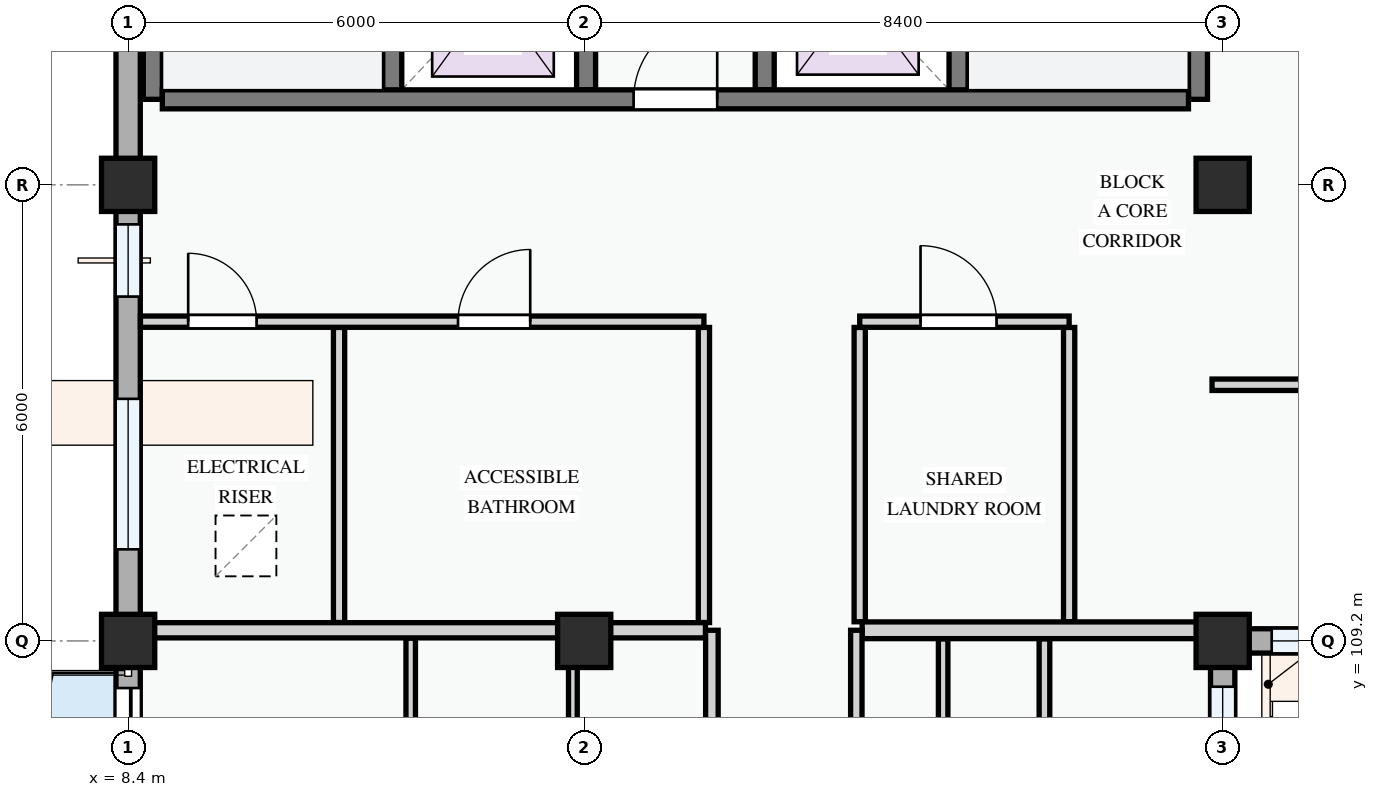
"""IFC4 building model, lengths in metres.
Left out: names, types, materials, properties, quantities, classifications, styles, units other than length and angle.
Written with IfcOpenShell. Run it as: python <this file> out.ifc"""

import sys

from ifc_helpers import new_model, si_unit, direction, frame, frame_2d, origin, origin_2d, place, context, subcontext, project, spatial, rectangle, extrude, element, fill, save


model = new_model("IFC4")
c1 = context("Model", 3, precision=1e-05, world=origin(), true_north=direction((0.0, 1.0)))
c2 = subcontext(c1, "Body", "Model", "MODEL_VIEW")
j1 = project(units=[si_unit("LENGTHUNIT", "METRE"), si_unit("PLANEANGLEUNIT", "RADIAN")], contexts=[c1])
p1 = place(None, origin())
s1 = spatial("IfcSite", under=j1, at=p1, CompositionType="ELEMENT")
p2 = place(p1, origin())
s2 = spatial("IfcBuilding", under=s1, at=p2, CompositionType="ELEMENT")
p3 = place(p2, frame((0.0, 0.0, 21.3)))
s3 = spatial("IfcBuildingStorey", under=s2, at=p3, CompositionType="ELEMENT", Elevation=21.3)
for number, where, z_axis, x_axis in (
    (1, (8.4, 109.2, 0.0), (0.0, 0.0, 1.0), (1.0, 0.0, 0.0)),
    (2, (8.4, 115.2, 0.0), (0.0, 0.0, 1.0), (1.0, 0.0, 0.0)),
    (3, (14.4, 109.2, 0.0), (0.0, 0.0, 1.0), (1.0, 0.0, 0.0)),
    (4, (22.8, 109.2, 0.0), (0.0, 0.0, 1.0), (1.0, 0.0, 0.0)),
    (5, (22.8, 115.2, 0.0), (0.0, 0.0, 1.0), (1.0, 0.0, 0.0)),
):
    element("IfcColumn", number, at=place(p3, frame(where, z_axis=z_axis, x_axis=x_axis)), inside=s3, PredefinedType="COLUMN", context=c2, shape_type="SweptSolid", body=[
        extrude(rectangle(XDim=0.7, YDim=0.7, at=origin_2d()), origin(), (0.0, 0.0, 1.0), 3.3),
    ])
p4 = place(p3, frame((22.8, 109.2, 0.0), z_axis=(0.0, 0.0, 1.0), x_axis=(1.0, 0.0, 0.0)))
e6 = element("IfcWall", 6, at=p4, inside=s3, PredefinedType="STANDARD", context=c2, shape_type="SweptSolid", body=[
    extrude(rectangle(XDim=6.0, YDim=0.32, at=frame_2d((3.0, 0.0))), origin(), (0.0, 0.0, 1.0), 2.475),
])
p5 = place(p4, frame((0.645, 0.0, 0.78)))
e7 = element("IfcOpeningElement", 7, at=p5, cuts=e6, PredefinedType="OPENING", context=c2, shape_type="SweptSolid", body=[
    extrude(rectangle(XDim=1.25, YDim=1.45, at=frame_2d((0.625, 0.725))), frame((0.0, 0.17, 0.0), z_axis=(0.0, -1.0, 0.0), x_axis=(1.0, 0.0, 0.0)), (0.0, 0.0, 1.0), 0.34),
])
p6 = place(p4, frame((3.42, 0.0, 0.78)))
e8 = element("IfcOpeningElement", 8, at=p6, cuts=e6, PredefinedType="OPENING", context=c2, shape_type="SweptSolid", body=[
    extrude(rectangle(XDim=1.32, YDim=1.35, at=frame_2d((0.66, 0.675))), frame((0.0, 0.17, 0.0), z_axis=(0.0, -1.0, 0.0), x_axis=(1.0, 0.0, 0.0)), (0.0, 0.0, 1.0), 0.34),
])
p7 = place(p3, frame((8.4, 123.6, 0.0), z_axis=(0.0, 0.0, 1.0), x_axis=(0.0, -1.0, 0.0)))
e9 = element("IfcWall", 9, at=p7, inside=s3, PredefinedType="STANDARD", context=c2, shape_type="SweptSolid", body=[
    extrude(rectangle(XDim=8.4, YDim=0.32, at=frame_2d((4.2, 0.0))), origin(), (0.0, 0.0, 1.0), 2.345),
])
p8 = place(p7, frame((1.221, 0.0, 0.78)))
e10 = element("IfcOpeningElement", 10, at=p8, cuts=e9, PredefinedType="OPENING", context=c2, shape_type="SweptSolid", body=[
    extrude(rectangle(XDim=1.55, YDim=1.4, at=frame_2d((0.775, 0.7))), frame((0.0, 0.17, 0.0), z_axis=(0.0, -1.0, 0.0), x_axis=(1.0, 0.0, 0.0)), (0.0, 0.0, 1.0), 0.34),
])
p9 = place(p7, frame((4.809, 0.0, 0.78)))
e11 = element("IfcOpeningElement", 11, at=p9, cuts=e9, PredefinedType="OPENING", context=c2, shape_type="SweptSolid", body=[
    extrude(rectangle(XDim=1.32, YDim=1.35, at=frame_2d((0.66, 0.675))), frame((0.0, 0.17, 0.0), z_axis=(0.0, -1.0, 0.0), x_axis=(1.0, 0.0, 0.0)), (0.0, 0.0, 1.0), 0.34),
])
p10 = place(p3, frame((8.4, 115.2, 0.0), z_axis=(0.0, 0.0, 1.0), x_axis=(0.0, -1.0, 0.0)))
e12 = element("IfcWall", 12, at=p10, inside=s3, PredefinedType="STANDARD", context=c2, shape_type="SweptSolid", body=[
    extrude(rectangle(XDim=6.0, YDim=0.32, at=frame_2d((3.0, 0.0))), origin(), (0.0, 0.0, 1.0), 2.445),
])
p11 = place(p10, frame((0.52, 0.0, 0.78)))
e13 = element("IfcOpeningElement", 13, at=p11, cuts=e12, PredefinedType="OPENING", context=c2, shape_type="SweptSolid", body=[
    extrude(rectangle(XDim=0.95, YDim=1.15, at=frame_2d((0.475, 0.575))), frame((0.0, 0.17, 0.0), z_axis=(0.0, -1.0, 0.0), x_axis=(1.0, 0.0, 0.0)), (0.0, 0.0, 1.0), 0.34),
])
p12 = place(p10, frame((2.815, 0.0, 0.78)))
e14 = element("IfcOpeningElement", 14, at=p12, cuts=e12, PredefinedType="OPENING", context=c2, shape_type="SweptSolid", body=[
    extrude(rectangle(XDim=1.98, YDim=1.5, at=frame_2d((0.99, 0.75))), frame((0.0, 0.17, 0.0), z_axis=(0.0, -1.0, 0.0), x_axis=(1.0, 0.0, 0.0)), (0.0, 0.0, 1.0), 0.34),
])
p13 = place(p3, frame((8.4, 109.2, 0.0), z_axis=(0.0, 0.0, 1.0), x_axis=(0.0, -1.0, 0.0)))
e15 = element("IfcWall", 15, at=p13, inside=s3, PredefinedType="STANDARD", context=c2, shape_type="SweptSolid", body=[
    extrude(rectangle(XDim=8.4, YDim=0.32, at=frame_2d((4.2, 0.0))), origin(), (0.0, 0.0, 1.0), 2.345),
])
p14 = place(p13, frame((0.62, 0.0, 0.0)))
e16 = element("IfcOpeningElement", 16, at=p14, cuts=e15, PredefinedType="OPENING", context=c2, shape_type="SweptSolid", body=[
    extrude(rectangle(XDim=1.5, YDim=2.2, at=frame_2d((0.75, 1.1))), frame((0.0, 0.17, 0.0), z_axis=(0.0, -1.0, 0.0), x_axis=(1.0, 0.0, 0.0)), (0.0, 0.0, 1.0), 0.34),
])
p15 = place(p13, frame((2.808, 0.0, 0.78)))
e17 = element("IfcOpeningElement", 17, at=p15, cuts=e15, PredefinedType="OPENING", context=c2, shape_type="SweptSolid", body=[
    extrude(rectangle(XDim=1.55, YDim=1.4, at=frame_2d((0.775, 0.7))), frame((0.0, 0.17, 0.0), z_axis=(0.0, -1.0, 0.0), x_axis=(1.0, 0.0, 0.0)), (0.0, 0.0, 1.0), 0.34),
])
p16 = place(p13, frame((5.363, 0.0, 0.78)))
e18 = element("IfcOpeningElement", 18, at=p16, cuts=e15, PredefinedType="OPENING", context=c2, shape_type="SweptSolid", body=[
    extrude(rectangle(XDim=2.48, YDim=1.46, at=frame_2d((1.24, 0.73))), frame((0.0, 0.17, 0.0), z_axis=(0.0, -1.0, 0.0), x_axis=(1.0, 0.0, 0.0)), (0.0, 0.0, 1.0), 0.34),
])
p17 = place(p3, frame((22.8, 100.8, 0.0), z_axis=(0.0, 0.0, 1.0), x_axis=(0.0, 1.0, 0.0)))
e19 = element("IfcWall", 19, at=p17, inside=s3, PredefinedType="STANDARD", context=c2, shape_type="SweptSolid", body=[
    extrude(rectangle(XDim=8.4, YDim=0.32, at=frame_2d((4.2, 0.0))), origin(), (0.0, 0.0, 1.0), 2.425),
])
p18 = place(p17, frame((0.955, 0.0, 0.78)))
e20 = element("IfcOpeningElement", 20, at=p18, cuts=e19, PredefinedType="OPENING", context=c2, shape_type="SweptSolid", body=[
    extrude(rectangle(XDim=1.48, YDim=1.52, at=frame_2d((0.74, 0.76))), frame((0.0, 0.17, 0.0), z_axis=(0.0, -1.0, 0.0), x_axis=(1.0, 0.0, 0.0)), (0.0, 0.0, 1.0), 0.34),
])
p19 = place(p17, frame((3.887, 0.0, 0.78)))
e21 = element("IfcOpeningElement", 21, at=p19, cuts=e19, PredefinedType="OPENING", context=c2, shape_type="SweptSolid", body=[
    extrude(rectangle(XDim=1.2, YDim=1.35, at=frame_2d((0.6, 0.675))), frame((0.0, 0.17, 0.0), z_axis=(0.0, -1.0, 0.0), x_axis=(1.0, 0.0, 0.0)), (0.0, 0.0, 1.0), 0.34),
])
p20 = place(p17, frame((6.047, 0.0, 0.78)))
e22 = element("IfcOpeningElement", 22, at=p20, cuts=e19, PredefinedType="OPENING", context=c2, shape_type="SweptSolid", body=[
    extrude(rectangle(XDim=1.75, YDim=1.45, at=frame_2d((0.875, 0.725))), frame((0.0, 0.17, 0.0), z_axis=(0.0, -1.0, 0.0), x_axis=(1.0, 0.0, 0.0)), (0.0, 0.0, 1.0), 0.34),
])
p21 = place(p3, frame((11.875, 123.25, 0.0), z_axis=(0.0, 0.0, 1.0), x_axis=(0.0, -1.0, 0.0)))
e23 = element("IfcWall", 23, at=p21, inside=s3, PredefinedType="SHEAR", context=c2, shape_type="SweptSolid", body=[
    extrude(rectangle(XDim=6.925, YDim=0.25, at=frame_2d((3.462, 0.0))), origin(), (0.0, 0.0, 1.0), 3.0),
])
p22 = place(p21, frame((0.35, 0.0, 0.0)))
e24 = element("IfcOpeningElement", 24, at=p22, cuts=e23, PredefinedType="OPENING", context=c2, shape_type="SweptSolid", body=[
    extrude(rectangle(XDim=0.95, YDim=2.1, at=frame_2d((0.475, 1.05))), frame((0.0, 0.135, 0.0), z_axis=(0.0, -1.0, 0.0), x_axis=(1.0, 0.0, 0.0)), (0.0, 0.0, 1.0), 0.27),
])
p23 = place(p3, frame((8.725, 123.4, 0.0), z_axis=(0.0, 0.0, 1.0), x_axis=(0.0, -1.0, 0.0)))
e25 = element("IfcWall", 25, at=p23, inside=s3, PredefinedType="SHEAR", context=c2, shape_type="SweptSolid", body=[
    extrude(rectangle(XDim=7.075, YDim=0.25, at=frame_2d((3.538, 0.0))), origin(), (0.0, 0.0, 1.0), 3.0),
])
p24 = place(p3, frame((22.475, 123.25, 0.0), z_axis=(0.0, 0.0, 1.0), x_axis=(0.0, -1.0, 0.0)))
e26 = element("IfcWall", 26, at=p24, inside=s3, PredefinedType="SHEAR", context=c2, shape_type="SweptSolid", body=[
    extrude(rectangle(XDim=6.925, YDim=0.25, at=frame_2d((3.462, 0.0))), origin(), (0.0, 0.0, 1.0), 3.0),
])
p25 = place(p3, frame((19.325, 123.25, 0.0), z_axis=(0.0, 0.0, 1.0), x_axis=(0.0, -1.0, 0.0)))
e27 = element("IfcWall", 27, at=p25, inside=s3, PredefinedType="SHEAR", context=c2, shape_type="SweptSolid", body=[
    extrude(rectangle(XDim=6.925, YDim=0.25, at=frame_2d((3.462, 0.0))), origin(), (0.0, 0.0, 1.0), 3.0),
])
p26 = place(p25, frame((0.35, 0.0, 0.0)))
e28 = element("IfcOpeningElement", 28, at=p26, cuts=e27, PredefinedType="OPENING", context=c2, shape_type="SweptSolid", body=[
    extrude(rectangle(XDim=0.95, YDim=2.1, at=frame_2d((0.475, 1.05))), frame((0.0, 0.135, 0.0), z_axis=(0.0, -1.0, 0.0), x_axis=(1.0, 0.0, 0.0)), (0.0, 0.0, 1.0), 0.27),
])
for number, where, z_axis, x_axis in (
    (29, (14.425, 118.875, 0.0), (0.0, 0.0, 1.0), (0.0, -1.0, 0.0)),
    (30, (16.775, 118.875, 0.0), (0.0, 0.0, 1.0), (0.0, -1.0, 0.0)),
):
    element("IfcWall", number, at=place(p3, frame(where, z_axis=z_axis, x_axis=x_axis)), inside=s3, PredefinedType="SHEAR", context=c2, shape_type="SweptSolid", body=[
        extrude(rectangle(XDim=2.425, YDim=0.25, at=frame_2d((1.212, 0.0))), origin(), (0.0, 0.0, 1.0), 3.0),
    ])
p27 = place(p3, frame((8.85, 116.325, 0.0), z_axis=(0.0, 0.0, 1.0), x_axis=(1.0, 0.0, 0.0)))
e31 = element("IfcWall", 31, at=p27, inside=s3, PredefinedType="SHEAR", context=c2, shape_type="SweptSolid", body=[
    extrude(rectangle(XDim=13.5, YDim=0.25, at=frame_2d((6.75, 0.0))), origin(), (0.0, 0.0, 1.0), 3.0),
])
p28 = place(p27, frame((6.2, 0.0, 0.0)))
e32 = element("IfcOpeningElement", 32, at=p28, cuts=e31, PredefinedType="OPENING", context=c2, shape_type="SweptSolid", body=[
    extrude(rectangle(XDim=1.1, YDim=2.15, at=frame_2d((0.55, 1.075))), frame((0.0, 0.135, 0.0), z_axis=(0.0, -1.0, 0.0), x_axis=(1.0, 0.0, 0.0)), (0.0, 0.0, 1.0), 0.27),
])
for number, where, z_axis, x_axis in (
    (33, (11.175, 113.324, 0.0), (0.0, 0.0, 1.0), (0.0, -1.0, 0.0)),
    (34, (15.975, 113.324, 0.0), (0.0, 0.0, 1.0), (0.0, -1.0, 0.0)),
):
    element("IfcWall", number, at=place(p3, frame(where, z_axis=z_axis, x_axis=x_axis)), inside=s3, PredefinedType="PARTITIONING", context=c2, shape_type="SweptSolid", body=[
        extrude(rectangle(XDim=3.882, YDim=0.148, at=frame_2d((1.941, 0.0))), origin(), (0.0, 0.0, 1.0), 3.0),
    ])
for number, where, z_axis, x_axis in (
    (35, (18.025, 113.324, 0.0), (0.0, 0.0, 1.0), (0.0, -1.0, 0.0)),
    (36, (20.78, 113.324, 0.0), (0.0, 0.0, 1.0), (0.0, -1.0, 0.0)),
):
    element("IfcWall", number, at=place(p3, frame(where, z_axis=z_axis, x_axis=x_axis)), inside=s3, PredefinedType="PARTITIONING", context=c2, shape_type="SweptSolid", body=[
        extrude(rectangle(XDim=3.872, YDim=0.148, at=frame_2d((1.936, 0.0))), origin(), (0.0, 0.0, 1.0), 3.0),
    ])
p29 = place(p3, frame((8.562, 113.4, 0.0), z_axis=(0.0, 0.0, 1.0), x_axis=(1.0, 0.0, 0.0)))
e37 = element("IfcWall", 37, at=p29, inside=s3, PredefinedType="PARTITIONING", context=c2, shape_type="SweptSolid", body=[
    extrude(rectangle(XDim=7.413, YDim=0.148, at=frame_2d((3.707, 0.0))), origin(), (0.0, 0.0, 1.0), 3.0),
])
p30 = place(p29, frame((0.628, 0.0, 0.0)))
e38 = element("IfcOpeningElement", 38, at=p30, cuts=e37, PredefinedType="OPENING", context=c2, shape_type="SweptSolid", body=[
    extrude(rectangle(XDim=0.9, YDim=2.1, at=frame_2d((0.45, 1.05))), frame((0.0, 0.084, 0.0), z_axis=(0.0, -1.0, 0.0), x_axis=(1.0, 0.0, 0.0)), (0.0, 0.0, 1.0), 0.168),
])
p31 = place(p29, frame((4.178, 0.0, 0.0)))
e39 = element("IfcOpeningElement", 39, at=p31, cuts=e37, PredefinedType="OPENING", context=c2, shape_type="SweptSolid", body=[
    extrude(rectangle(XDim=0.95, YDim=2.1, at=frame_2d((0.475, 1.05))), frame((0.0, 0.084, 0.0), z_axis=(0.0, -1.0, 0.0), x_axis=(1.0, 0.0, 0.0)), (0.0, 0.0, 1.0), 0.168),
])
p32 = place(p3, frame((18.025, 113.4, 0.0), z_axis=(0.0, 0.0, 1.0), x_axis=(1.0, 0.0, 0.0)))
e40 = element("IfcWall", 40, at=p32, inside=s3, PredefinedType="PARTITIONING", context=c2, shape_type="SweptSolid", body=[
    extrude(rectangle(XDim=2.755, YDim=0.148, at=frame_2d((1.377, 0.0))), origin(), (0.0, 0.0, 1.0), 3.0),
])
p33 = place(p32, frame((0.8, 0.0, 0.0)))
e41 = element("IfcOpeningElement", 41, at=p33, cuts=e40, PredefinedType="OPENING", context=c2, shape_type="SweptSolid", body=[
    extrude(rectangle(XDim=1.0, YDim=2.15, at=frame_2d((0.5, 1.075))), frame((0.0, 0.084, 0.0), z_axis=(0.0, -1.0, 0.0), x_axis=(1.0, 0.0, 0.0)), (0.0, 0.0, 1.0), 0.168),
])
p34 = place(p3, frame((22.66, 112.57, 0.0), z_axis=(0.0, 0.0, 1.0), x_axis=(1.0, 0.0, 0.0)))
e42 = element("IfcWall", 42, at=p34, inside=s3, PredefinedType="PARTITIONING", context=c2, shape_type="SweptSolid", body=[
    extrude(rectangle(XDim=2.406, YDim=0.15, at=frame_2d((1.203, 0.0))), origin(), (0.0, 0.0, 1.0), 3.0),
])
p35 = place(p3, frame((12.118, 104.277, 0.0), z_axis=(0.0, 0.0, 1.0), x_axis=(0.0, 1.0, 0.0)))
e43 = element("IfcWall", 43, at=p35, inside=s3, PredefinedType="PARTITIONING", context=c2, shape_type="SweptSolid", body=[
    extrude(rectangle(XDim=4.961, YDim=0.125, at=frame_2d((2.48, 0.0))), origin(), (0.0, 0.0, 1.0), 3.0),
])
p36 = place(p3, frame((14.251, 104.277, 0.0), z_axis=(0.0, 0.0, 1.0), x_axis=(0.0, 1.0, 0.0)))
e44 = element("IfcWall", 44, at=p36, inside=s3, PredefinedType="PARTITIONING", context=c2, shape_type="SweptSolid", body=[
    extrude(rectangle(XDim=4.961, YDim=0.115, at=frame_2d((2.48, 0.0))), origin(), (0.0, 0.0, 1.0), 2.425),
])
p37 = place(p3, frame((20.455, 104.052, 0.0), z_axis=(0.0, 0.0, 1.0), x_axis=(0.0, 1.0, 0.0)))
e45 = element("IfcWall", 45, at=p37, inside=s3, PredefinedType="PARTITIONING", context=c2, shape_type="SweptSolid", body=[
    extrude(rectangle(XDim=5.177, YDim=0.14, at=frame_2d((2.588, 0.0))), origin(), (0.0, 0.0, 1.0), 3.0),
])
p38 = place(p3, frame((19.122, 104.052, 0.0), z_axis=(0.0, 0.0, 1.0), x_axis=(0.0, 1.0, 0.0)))
e46 = element("IfcWall", 46, at=p38, inside=s3, PredefinedType="PARTITIONING", context=c2, shape_type="SweptSolid", body=[
    extrude(rectangle(XDim=5.177, YDim=0.125, at=frame_2d((2.588, 0.0))), origin(), (0.0, 0.0, 1.0), 3.0),
])
p39 = place(p3, frame((8.562, 109.34, 0.0), z_axis=(0.0, 0.0, 1.0), x_axis=(1.0, 0.0, 0.0)))
e47 = element("IfcWall", 47, at=p39, inside=s3, PredefinedType="PARTITIONING", context=c2, shape_type="SweptSolid", body=[
    extrude(rectangle(XDim=7.434, YDim=0.2, at=frame_2d((3.717, 0.0))), origin(), (0.0, 0.0, 1.0), 2.375),
])
p40 = place(p3, frame((18.057, 109.34, 0.0), z_axis=(0.0, 0.0, 1.0), x_axis=(1.0, 0.0, 0.0)))
e48 = element("IfcWall", 48, at=p40, inside=s3, PredefinedType="PARTITIONING", context=c2, shape_type="SweptSolid", body=[
    extrude(rectangle(XDim=4.683, YDim=0.22, at=frame_2d((2.342, 0.0))), origin(), (0.0, 0.0, 1.0), 2.375),
])
p41 = place(p3, frame((16.08, 86.562, 0.0), z_axis=(0.0, 0.0, 1.0), x_axis=(0.0, 1.0, 0.0)))
e49 = element("IfcWall", 49, at=p41, inside=s3, PredefinedType="PARTITIONING", context=c2, shape_type="SweptSolid", body=[
    extrude(rectangle(XDim=22.778, YDim=0.165, at=frame_2d((11.389, 0.0))), origin(), (0.0, 0.0, 1.0), 3.0),
])
p42 = place(p41, frame((3.63, 0.0, 0.0)))
e50 = element("IfcOpeningElement", 50, at=p42, cuts=e49, PredefinedType="OPENING", context=c2, shape_type="SweptSolid", body=[
    extrude(rectangle(XDim=0.92, YDim=2.1, at=frame_2d((0.46, 1.05))), frame((0.0, 0.093, 0.0), z_axis=(0.0, -1.0, 0.0), x_axis=(1.0, 0.0, 0.0)), (0.0, 0.0, 1.0), 0.185),
])
p43 = place(p41, frame((16.433, 0.0, 0.0)))
e51 = element("IfcOpeningElement", 51, at=p43, cuts=e49, PredefinedType="OPENING", context=c2, shape_type="SweptSolid", body=[
    extrude(rectangle(XDim=0.92, YDim=2.1, at=frame_2d((0.46, 1.05))), frame((0.0, 0.093, 0.0), z_axis=(0.0, -1.0, 0.0), x_axis=(1.0, 0.0, 0.0)), (0.0, 0.0, 1.0), 0.185),
])
p44 = place(p3, frame((17.98, 86.562, 0.0), z_axis=(0.0, 0.0, 1.0), x_axis=(0.0, 1.0, 0.0)))
e52 = element("IfcWall", 52, at=p44, inside=s3, PredefinedType="PARTITIONING", context=c2, shape_type="SweptSolid", body=[
    extrude(rectangle(XDim=22.778, YDim=0.15, at=frame_2d((11.389, 0.0))), origin(), (0.0, 0.0, 1.0), 3.0),
])
p45 = place(p44, frame((3.593, 0.0, 0.0)))
e53 = element("IfcOpeningElement", 53, at=p45, cuts=e52, PredefinedType="OPENING", context=c2, shape_type="SweptSolid", body=[
    extrude(rectangle(XDim=0.92, YDim=2.1, at=frame_2d((0.46, 1.05))), frame((0.0, 0.085, 0.0), z_axis=(0.0, -1.0, 0.0), x_axis=(1.0, 0.0, 0.0)), (0.0, 0.0, 1.0), 0.17),
])
p46 = place(p44, frame((16.228, 0.0, 0.0)))
e54 = element("IfcOpeningElement", 54, at=p46, cuts=e52, PredefinedType="OPENING", context=c2, shape_type="SweptSolid", body=[
    extrude(rectangle(XDim=0.92, YDim=2.1, at=frame_2d((0.46, 1.05))), frame((0.0, 0.085, 0.0), z_axis=(0.0, -1.0, 0.0), x_axis=(1.0, 0.0, 0.0)), (0.0, 0.0, 1.0), 0.17),
])
p47 = place(p5, origin())
e55 = element("IfcWindow", 55, at=p47, inside=s3, PartitioningType="SINGLE_PANEL", PredefinedType="WINDOW", context=c2, shape_type="SweptSolid", body=[
    extrude(rectangle(XDim=1.25, YDim=1.45, at=frame_2d((0.625, 0.725))), frame((0.0, 0.03, 0.0), z_axis=(0.0, -1.0, 0.0), x_axis=(1.0, 0.0, 0.0)), (0.0, 0.0, 1.0), 0.06),
])
fill(e7, e55)
p48 = place(p11, origin())
e56 = element("IfcWindow", 56, at=p48, inside=s3, PartitioningType="SINGLE_PANEL", PredefinedType="WINDOW", context=c2, shape_type="SweptSolid", body=[
    extrude(rectangle(XDim=0.95, YDim=1.15, at=frame_2d((0.475, 0.575))), frame((0.0, 0.03, 0.0), z_axis=(0.0, -1.0, 0.0), x_axis=(1.0, 0.0, 0.0)), (0.0, 0.0, 1.0), 0.06),
])
fill(e13, e56)
p49 = place(p12, origin())
e57 = element("IfcWindow", 57, at=p49, inside=s3, PartitioningType="DOUBLE_PANEL_VERTICAL", PredefinedType="WINDOW", context=c2, shape_type="SweptSolid", body=[
    extrude(rectangle(XDim=1.98, YDim=1.5, at=frame_2d((0.99, 0.75))), frame((0.0, 0.03, 0.0), z_axis=(0.0, -1.0, 0.0), x_axis=(1.0, 0.0, 0.0)), (0.0, 0.0, 1.0), 0.06),
])
fill(e14, e57)
p50 = place(p14, frame((1.5, 0.0, 0.0), z_axis=(0.0, 0.0, 1.0), x_axis=(-1.0, 0.0, 0.0)))
e58 = element("IfcDoor", 58, at=p50, inside=s3, OperationType="SLIDING_TO_RIGHT", PredefinedType="DOOR", context=c2, shape_type="SweptSolid", body=[
    extrude(rectangle(XDim=1.5, YDim=2.2, at=frame_2d((0.75, 1.1))), frame((0.0, 0.025, 0.0), z_axis=(0.0, -1.0, 0.0), x_axis=(1.0, 0.0, 0.0)), (0.0, 0.0, 1.0), 0.05),
])
fill(e16, e58)
p51 = place(p20, origin())
e59 = element("IfcWindow", 59, at=p51, inside=s3, PartitioningType="DOUBLE_PANEL_VERTICAL", PredefinedType="WINDOW", context=c2, shape_type="SweptSolid", body=[
    extrude(rectangle(XDim=1.75, YDim=1.45, at=frame_2d((0.875, 0.725))), frame((0.0, 0.03, 0.0), z_axis=(0.0, -1.0, 0.0), x_axis=(1.0, 0.0, 0.0)), (0.0, 0.0, 1.0), 0.06),
])
fill(e22, e59)
p52 = place(p28, origin())
e60 = element("IfcDoor", 60, at=p52, inside=s3, OperationType="SINGLE_SWING_RIGHT", PredefinedType="DOOR", context=c2, shape_type="SweptSolid", body=[
    extrude(rectangle(XDim=1.1, YDim=2.15, at=frame_2d((0.55, 1.075))), frame((0.0, 0.025, 0.0), z_axis=(0.0, -1.0, 0.0), x_axis=(1.0, 0.0, 0.0)), (0.0, 0.0, 1.0), 0.05),
])
fill(e32, e60)
p53 = place(p30, origin())
e61 = element("IfcDoor", 61, at=p53, inside=s3, OperationType="SINGLE_SWING_LEFT", PredefinedType="DOOR", context=c2, shape_type="SweptSolid", body=[
    extrude(rectangle(XDim=0.9, YDim=2.1, at=frame_2d((0.45, 1.05))), frame((0.0, 0.025, 0.0), z_axis=(0.0, -1.0, 0.0), x_axis=(1.0, 0.0, 0.0)), (0.0, 0.0, 1.0), 0.05),
])
fill(e38, e61)
p54 = place(p31, origin())
e62 = element("IfcDoor", 62, at=p54, inside=s3, OperationType="SINGLE_SWING_RIGHT", PredefinedType="DOOR", context=c2, shape_type="SweptSolid", body=[
    extrude(rectangle(XDim=0.95, YDim=2.1, at=frame_2d((0.475, 1.05))), frame((0.0, 0.025, 0.0), z_axis=(0.0, -1.0, 0.0), x_axis=(1.0, 0.0, 0.0)), (0.0, 0.0, 1.0), 0.05),
])
fill(e39, e62)
p55 = place(p33, origin())
e63 = element("IfcDoor", 63, at=p55, inside=s3, OperationType="SINGLE_SWING_LEFT", PredefinedType="DOOR", context=c2, shape_type="SweptSolid", body=[
    extrude(rectangle(XDim=1.0, YDim=2.15, at=frame_2d((0.5, 1.075))), frame((0.0, 0.025, 0.0), z_axis=(0.0, -1.0, 0.0), x_axis=(1.0, 0.0, 0.0)), (0.0, 0.0, 1.0), 0.05),
])
fill(e41, e63)
save(model, sys.argv[1])
